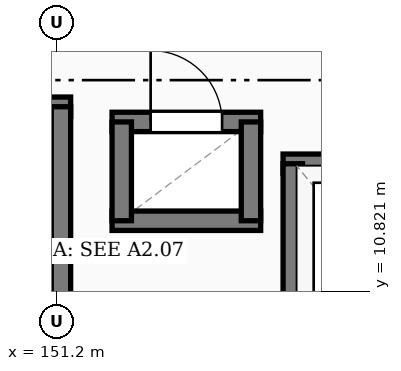
"""IFC4 building model, lengths in metres.
Left out: names, types, materials, properties, quantities, classifications, styles, units other than length and angle.
Written with IfcOpenShell. Run it as: python <this file> out.ifc"""

import sys

from ifc_helpers import new_model, si_unit, direction, frame, frame_2d, origin, place, context, subcontext, project, spatial, rectangle, extrude, element, fill, save


model = new_model("IFC4")
c1 = context("Model", 3, precision=1e-05, world=origin(), true_north=direction((0.0, 1.0)))
c2 = subcontext(c1, "Body", "Model", "MODEL_VIEW")
j1 = project(units=[si_unit("LENGTHUNIT", "METRE"), si_unit("PLANEANGLEUNIT", "RADIAN")], contexts=[c1])
p1 = place(None, origin())
s1 = spatial("IfcSite", under=j1, at=p1, CompositionType="ELEMENT")
p2 = place(p1, origin())
s2 = spatial("IfcBuilding", under=s1, at=p2, CompositionType="ELEMENT")
p3 = place(p2, frame((0.0, 0.0, -4.2)))
s3 = spatial("IfcBuildingStorey", under=s2, at=p3, CompositionType="ELEMENT", Elevation=-4.2)
p4 = place(p3, frame((143.153, 13.25, -0.4), z_axis=(0.0, 0.0, 1.0), x_axis=(1.0, 0.0, 0.0)))
e1 = element("IfcWall", 1, at=p4, inside=s3, PredefinedType="SOLIDWALL", context=c2, shape_type="SweptSolid", body=[
    extrude(rectangle(XDim=8.225, YDim=0.255, at=frame_2d((4.112, 0.0))), origin(), (0.0, 0.0, 1.0), 4.25),
])
p5 = place(p4, frame((0.35, 0.0, 0.4)))
e2 = element("IfcOpeningElement", 2, at=p5, cuts=e1, PredefinedType="OPENING", context=c2, shape_type="SweptSolid", body=[
    extrude(rectangle(XDim=1.25, YDim=2.2, at=frame_2d((0.625, 1.1))), frame((0.0, 0.137, 0.0), z_axis=(0.0, -1.0, 0.0), x_axis=(1.0, 0.0, 0.0)), (0.0, 0.0, 1.0), 0.275),
])
p6 = place(p3, frame((151.25, 9.38, -0.4), z_axis=(0.0, 0.0, 1.0), x_axis=(0.0, 1.0, 0.0)))
e3 = element("IfcWall", 3, at=p6, inside=s3, PredefinedType="SOLIDWALL", context=c2, shape_type="SweptSolid", body=[
    extrude(rectangle(XDim=3.87, YDim=0.255, at=frame_2d((1.935, 0.0))), origin(), (0.0, 0.0, 1.0), 4.25),
])
p7 = place(p3, frame((154.173, 12.5, -0.4), z_axis=(0.0, 0.0, 1.0), x_axis=(1.0, 0.0, 0.0)))
e4 = element("IfcWall", 4, at=p7, inside=s3, PredefinedType="SOLIDWALL", context=c2, shape_type="SweptSolid", body=[
    extrude(rectangle(XDim=2.455, YDim=0.255, at=frame_2d((1.228, 0.0))), origin(), (0.0, 0.0, 1.0), 4.25),
])
p8 = place(p7, frame((0.677, 0.0, 0.4)))
e5 = element("IfcOpeningElement", 5, at=p8, cuts=e4, PredefinedType="OPENING", context=c2, shape_type="SweptSolid", body=[
    extrude(rectangle(XDim=1.1, YDim=2.15, at=frame_2d((0.55, 1.075))), frame((0.0, 0.137, 0.0), z_axis=(0.0, -1.0, 0.0), x_axis=(1.0, 0.0, 0.0)), (0.0, 0.0, 1.0), 0.275),
])
p9 = place(p3, frame((154.3, 9.9, -0.4), z_axis=(0.0, 0.0, 1.0), x_axis=(0.0, 1.0, 0.0)))
e6 = element("IfcWall", 6, at=p9, inside=s3, PredefinedType="SOLIDWALL", context=c2, shape_type="SweptSolid", body=[
    extrude(rectangle(XDim=2.6, YDim=0.255, at=frame_2d((1.3, 0.0))), origin(), (0.0, 0.0, 1.0), 4.25),
])
p10 = place(p3, frame((151.923, 11.75, -0.4), z_axis=(0.0, 0.0, 1.0), x_axis=(1.0, 0.0, 0.0)))
e7 = element("IfcWall", 7, at=p10, inside=s3, PredefinedType="SOLIDWALL", context=c2, shape_type="SweptSolid", body=[
    extrude(rectangle(XDim=1.955, YDim=0.255, at=frame_2d((0.978, 0.0))), origin(), (0.0, 0.0, 1.0), 4.25),
])
p11 = place(p3, frame((151.923, 13.05, -0.4), z_axis=(0.0, 0.0, 1.0), x_axis=(1.0, 0.0, 0.0)))
e8 = element("IfcWall", 8, at=p11, inside=s3, PredefinedType="SOLIDWALL", context=c2, shape_type="SweptSolid", body=[
    extrude(rectangle(XDim=1.955, YDim=0.255, at=frame_2d((0.978, 0.0))), origin(), (0.0, 0.0, 1.0), 4.25),
])
p12 = place(p11, frame((0.508, 0.0, 0.4)))
e9 = element("IfcOpeningElement", 9, at=p12, cuts=e8, PredefinedType="OPENING", context=c2, shape_type="SweptSolid", body=[
    extrude(rectangle(XDim=0.94, YDim=2.1, at=frame_2d((0.47, 1.05))), frame((0.0, 0.137, 0.0), z_axis=(0.0, -1.0, 0.0), x_axis=(1.0, 0.0, 0.0)), (0.0, 0.0, 1.0), 0.275),
])
for number, where, z_axis, x_axis in (
    (10, (152.05, 11.75, -0.4), (0.0, 0.0, 1.0), (0.0, 1.0, 0.0)),
    (11, (153.75, 11.75, -0.4), (0.0, 0.0, 1.0), (0.0, 1.0, 0.0)),
):
    element("IfcWall", number, at=place(p3, frame(where, z_axis=z_axis, x_axis=x_axis)), inside=s3, PredefinedType="SOLIDWALL", context=c2, shape_type="SweptSolid", body=[
        extrude(rectangle(XDim=1.3, YDim=0.255, at=frame_2d((0.65, 0.0))), origin(), (0.0, 0.0, 1.0), 4.25),
    ])
p13 = place(p12, origin())
e12 = element("IfcDoor", 12, at=p13, inside=s3, OperationType="SINGLE_SWING_LEFT", PredefinedType="DOOR", context=c2, shape_type="SweptSolid", body=[
    extrude(rectangle(XDim=0.94, YDim=2.1, at=frame_2d((0.47, 1.05))), frame((0.0, 0.025, 0.0), z_axis=(0.0, -1.0, 0.0), x_axis=(1.0, 0.0, 0.0)), (0.0, 0.0, 1.0), 0.05),
])
fill(e9, e12)
save(model, sys.argv[1])
